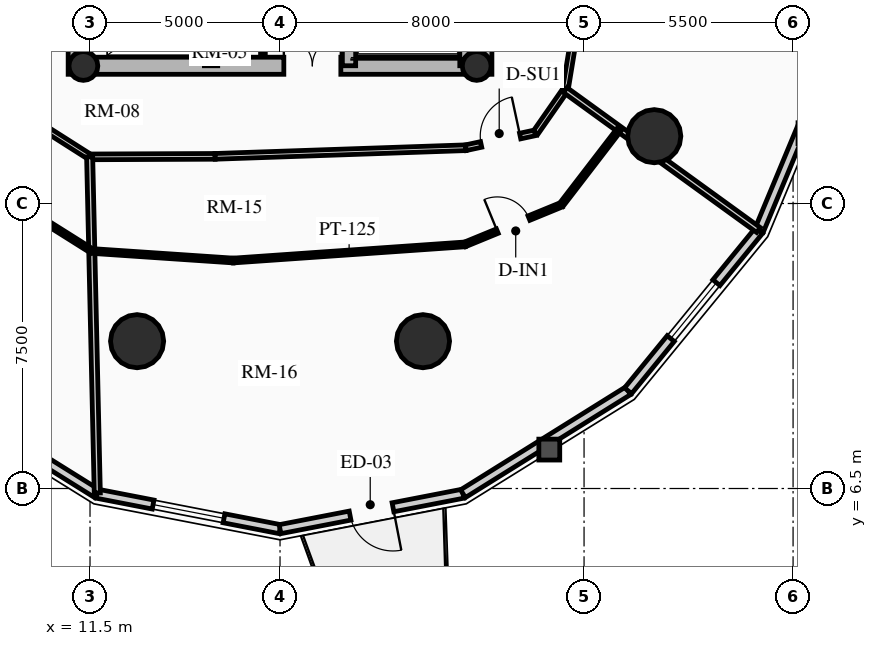
"""IFC4 building model, lengths in metres.
Left out: names, types, materials, properties, quantities, classifications, styles, units other than length and angle.
Written with IfcOpenShell. Run it as: python <this file> out.ifc"""

import sys

from ifc_helpers import new_model, si_unit, direction, frame, frame_2d, origin, origin_2d, place, context, subcontext, project, spatial, rectangle, circle, hollow_circle, extrude, source, transform, mapped, element, fill, save


model = new_model("IFC4")
c1 = context("Model", 3, precision=1e-05, world=origin(), true_north=direction((0.0, 1.0)))
c2 = subcontext(c1, "Body", "Model", "MODEL_VIEW")
j1 = project(units=[si_unit("LENGTHUNIT", "METRE"), si_unit("PLANEANGLEUNIT", "RADIAN")], contexts=[c1])
p1 = place(None, origin())
s1 = spatial("IfcSite", under=j1, at=p1, CompositionType="ELEMENT")
p2 = place(p1, origin())
s2 = spatial("IfcBuilding", under=s1, at=p2, CompositionType="ELEMENT")
p3 = place(p2, frame((0.0, 0.0, 87.61)))
s3 = spatial("IfcBuildingStorey", under=s2, at=p3, CompositionType="ELEMENT", Elevation=87.61)
for number, where, z_axis, x_axis in (
    (1, (11.15, 17.4, 0.0), (0.0, 0.0, 1.0), (0.0, 1.0, 0.0)),
    (2, (21.85, 17.4, 0.0), (0.0, 0.0, 1.0), (0.0, 1.0, 0.0)),
):
    element("IfcWall", number, at=place(p3, frame(where, z_axis=z_axis, x_axis=x_axis)), inside=s3, PredefinedType="SHEAR", context=c2, shape_type="SweptSolid", body=[
        extrude(rectangle(XDim=14.2, YDim=0.45, at=frame_2d((7.1, 0.0))), origin(), (0.0, 0.0, 1.0), 2.91),
    ])
p4 = place(p3, frame((11.15, 17.625, 0.0), z_axis=(0.0, 0.0, 1.0), x_axis=(1.0, 0.0, 0.0)))
e3 = element("IfcWall", 3, at=p4, inside=s3, PredefinedType="SHEAR", context=c2, shape_type="SweptSolid", body=[
    extrude(rectangle(XDim=10.7, YDim=0.45, at=frame_2d((5.35, 0.0))), origin(), (0.0, 0.0, 1.0), 2.91),
])
m1 = source(origin(), c2, "Body", "SweptSolid", [
    extrude(rectangle(XDim=1.5, YDim=2.02, at=frame_2d((0.75, 1.01))), frame((0.0, 0.235, 0.0), z_axis=(0.0, -1.0, 0.0), x_axis=(1.0, 0.0, 0.0)), (0.0, 0.0, 1.0), 0.47),
])
p5 = place(p4, frame((5.45, 0.0, 0.0)))
e4 = element("IfcOpeningElement", 4, at=p5, cuts=e3, PredefinedType="OPENING", context=c2, shape_type="MappedRepresentation", body=[
    mapped(m1, transform((0.0, 0.0, 0.0), x_axis=(1.0, 0.0, 0.0), y_axis=(0.0, 1.0, 0.0), z_axis=(0.0, 0.0, 1.0), scale=1.0)),
])
p6 = place(p3, frame((14.685, 17.625, 0.0), z_axis=(0.0, 0.0, 1.0), x_axis=(0.0, 1.0, 0.0)))
e5 = element("IfcWall", 5, at=p6, inside=s3, PredefinedType="SHEAR", context=c2, shape_type="SweptSolid", body=[
    extrude(rectangle(XDim=13.75, YDim=0.35, at=frame_2d((6.875, 0.0))), origin(), (0.0, 0.0, 1.0), 2.91),
])
m2 = source(origin(), c2, "Body", "SweptSolid", [
    extrude(rectangle(XDim=1.1, YDim=2.015, at=frame_2d((0.55, 1.007))), frame((0.0, 0.185, 0.0), z_axis=(0.0, -1.0, 0.0), x_axis=(1.0, 0.0, 0.0)), (0.0, 0.0, 1.0), 0.37),
])
p7 = place(p6, frame((4.875, 0.0, 0.0)))
e6 = element("IfcOpeningElement", 6, at=p7, cuts=e5, PredefinedType="OPENING", context=c2, shape_type="MappedRepresentation", body=[
    mapped(m2, transform((0.0, 0.0, 0.0), x_axis=(1.0, 0.0, 0.0), y_axis=(0.0, 1.0, 0.0), z_axis=(0.0, 0.0, 1.0), scale=1.0)),
])
m3 = source(origin(), c2, "Body", "SweptSolid", [
    extrude(rectangle(XDim=1.15, YDim=2.02, at=frame_2d((0.575, 1.01))), frame((0.0, 0.185, 0.0), z_axis=(0.0, -1.0, 0.0), x_axis=(1.0, 0.0, 0.0)), (0.0, 0.0, 1.0), 0.37),
])
p8 = place(p6, frame((7.295, 0.0, 0.0)))
e7 = element("IfcOpeningElement", 7, at=p8, cuts=e5, PredefinedType="OPENING", context=c2, shape_type="MappedRepresentation", body=[
    mapped(m3, transform((0.0, 0.0, 0.0), x_axis=(1.0, 0.0, 0.0), y_axis=(0.0, 1.0, 0.0), z_axis=(0.0, 0.0, 1.0), scale=1.0)),
])
p9 = place(p3, frame((18.315, 17.625, 0.0), z_axis=(0.0, 0.0, 1.0), x_axis=(0.0, 1.0, 0.0)))
e8 = element("IfcWall", 8, at=p9, inside=s3, PredefinedType="SHEAR", context=c2, shape_type="SweptSolid", body=[
    extrude(rectangle(XDim=13.75, YDim=0.35, at=frame_2d((6.875, 0.0))), origin(), (0.0, 0.0, 1.0), 2.91),
])
p10 = place(p9, frame((10.0, 0.0, 0.0)))
e9 = element("IfcOpeningElement", 9, at=p10, cuts=e8, PredefinedType="OPENING", context=c2, shape_type="MappedRepresentation", body=[
    mapped(m2, transform((0.0, 0.0, 0.0), x_axis=(1.0, 0.0, 0.0), y_axis=(0.0, 1.0, 0.0), z_axis=(0.0, 0.0, 1.0), scale=1.0)),
])
p11 = place(p9, frame((12.0, 0.0, 0.0)))
e10 = element("IfcOpeningElement", 10, at=p11, cuts=e8, PredefinedType="OPENING", context=c2, shape_type="MappedRepresentation", body=[
    mapped(m2, transform((0.0, 0.0, 0.0), x_axis=(1.0, 0.0, 0.0), y_axis=(0.0, 1.0, 0.0), z_axis=(0.0, 0.0, 1.0), scale=1.0)),
])
p12 = place(p9, frame((5.305, 0.0, 0.0)))
e11 = element("IfcOpeningElement", 11, at=p12, cuts=e8, PredefinedType="OPENING", context=c2, shape_type="MappedRepresentation", body=[
    mapped(m3, transform((0.0, 0.0, 0.0), x_axis=(1.0, 0.0, 0.0), y_axis=(0.0, 1.0, 0.0), z_axis=(0.0, 0.0, 1.0), scale=1.0)),
])
p13 = place(p3, frame((21.405, 17.625, 0.0), z_axis=(0.0, 0.0, 1.0), x_axis=(0.0, 1.0, 0.0)))
e12 = element("IfcWall", 12, at=p13, inside=s3, PredefinedType="SHEAR", context=c2, shape_type="SweptSolid", body=[
    extrude(rectangle(XDim=6.72, YDim=0.35, at=frame_2d((3.36, 0.0))), origin(), (0.0, 0.0, 1.0), 2.91),
])
for number, where, z_axis, x_axis in (
    (13, (11.325, 17.62, 0.0), (0.0, 0.0, 1.0), (1.0, 0.0, 0.0)),
    (14, (21.675, 17.62, 0.0), (0.0, 0.0, 1.0), (1.0, 0.0, 0.0)),
):
    element("IfcColumn", number, at=place(p3, frame(where, z_axis=z_axis, x_axis=x_axis)), inside=s3, PredefinedType="COLUMN", context=c2, shape_type="SweptSolid", body=[
        extrude(hollow_circle(Radius=0.38, WallThickness=0.032, at=origin_2d()), origin(), (0.0, 0.0, 1.0), 2.91),
    ])
for number, where, z_axis, x_axis in (
    (15, (12.739, 10.377, 0.0), (0.0, 0.0, 1.0), (1.0, 0.0, 0.0)),
    (16, (20.261, 10.377, 0.0), (0.0, 0.0, 1.0), (1.0, 0.0, 0.0)),
    (17, (26.347, 15.771, 0.0), (0.0, 0.0, 1.0), (1.0, 0.0, 0.0)),
):
    element("IfcColumn", number, at=place(p3, frame(where, z_axis=z_axis, x_axis=x_axis)), inside=s3, PredefinedType="USERDEFINED", context=c2, shape_type="SweptSolid", body=[
        extrude(circle(Radius=0.7, at=origin_2d()), origin(), (0.0, 0.0, 1.0), 2.91),
    ])
p14 = place(p3, frame((11.685, 6.363, 0.0), z_axis=(0.0, 0.0, 1.0), x_axis=(-0.848520380187, 0.529162701263, 0.0)))
e18 = element("IfcWall", 18, at=p14, inside=s3, PredefinedType="SOLIDWALL", context=c2, shape_type="SweptSolid", body=[
    extrude(rectangle(XDim=5.119, YDim=0.24, at=frame_2d((2.56, 0.0))), origin(), (0.0, 0.0, 1.0), 2.179),
])
m4 = source(origin(), c2, "Body", "SweptSolid", [
    extrude(rectangle(XDim=1.9, YDim=1.35, at=frame_2d((0.95, 0.675))), frame((0.0, 0.13, 0.0), z_axis=(0.0, -1.0, 0.0), x_axis=(1.0, 0.0, 0.0)), (0.0, 0.0, 1.0), 0.26),
])
p15 = place(p14, frame((1.609, 0.0, 0.65)))
e19 = element("IfcOpeningElement", 19, at=p15, cuts=e18, PredefinedType="OPENING", context=c2, shape_type="MappedRepresentation", body=[
    mapped(m4, transform((0.0, 0.0, 0.0), x_axis=(1.0, 0.0, 0.0), y_axis=(0.0, 1.0, 0.0), z_axis=(0.0, 0.0, 1.0), scale=1.0)),
])
p16 = place(p3, frame((16.5, 5.43, 0.0), z_axis=(0.0, 0.0, 1.0), x_axis=(-0.981723785992, 0.190311344954, 0.0)))
e20 = element("IfcWall", 20, at=p16, inside=s3, PredefinedType="SOLIDWALL", context=c2, shape_type="SweptSolid", body=[
    extrude(rectangle(XDim=4.904, YDim=0.24, at=frame_2d((2.452, 0.0))), origin(), (0.0, 0.0, 1.0), 2.179),
])
p17 = place(p16, frame((1.502, 0.0, 0.65)))
e21 = element("IfcOpeningElement", 21, at=p17, cuts=e20, PredefinedType="OPENING", context=c2, shape_type="MappedRepresentation", body=[
    mapped(m4, transform((0.0, 0.0, 0.0), x_axis=(1.0, 0.0, 0.0), y_axis=(0.0, 1.0, 0.0), z_axis=(0.0, 0.0, 1.0), scale=1.0)),
])
p18 = place(p3, frame((21.315, 6.363, 0.0), z_axis=(0.0, 0.0, 1.0), x_axis=(-0.981723785992, -0.190311344954, 0.0)))
e22 = element("IfcWall", 22, at=p18, inside=s3, PredefinedType="SOLIDWALL", context=c2, shape_type="SweptSolid", body=[
    extrude(rectangle(XDim=4.904, YDim=0.24, at=frame_2d((2.452, 0.0))), origin(), (0.0, 0.0, 1.0), 2.179),
])
m5 = source(origin(), c2, "Body", "SweptSolid", [
    extrude(rectangle(XDim=1.15, YDim=2.005, at=frame_2d((0.575, 1.002))), frame((0.0, 0.13, 0.0), z_axis=(0.0, -1.0, 0.0), x_axis=(1.0, 0.0, 0.0)), (0.0, 0.0, 1.0), 0.26),
])
p19 = place(p18, frame((1.877, 0.0, 0.0)))
e23 = element("IfcOpeningElement", 23, at=p19, cuts=e22, PredefinedType="OPENING", context=c2, shape_type="MappedRepresentation", body=[
    mapped(m5, transform((0.0, 0.0, 0.0), x_axis=(1.0, 0.0, 0.0), y_axis=(0.0, 1.0, 0.0), z_axis=(0.0, 0.0, 1.0), scale=1.0)),
])
p20 = place(p3, frame((25.658, 9.072, 0.0), z_axis=(0.0, 0.0, 1.0), x_axis=(-0.848520380187, -0.529162701263, 0.0)))
e24 = element("IfcWall", 24, at=p20, inside=s3, PredefinedType="SOLIDWALL", context=c2, shape_type="SweptSolid", body=[
    extrude(rectangle(XDim=5.119, YDim=0.24, at=frame_2d((2.56, 0.0))), origin(), (0.0, 0.0, 1.0), 2.179),
])
p21 = place(p3, frame((29.105, 13.291, 0.0), z_axis=(0.0, 0.0, 1.0), x_axis=(-0.632700781152, -0.77439635945, 0.0)))
e25 = element("IfcWall", 25, at=p21, inside=s3, PredefinedType="SOLIDWALL", context=c2, shape_type="SweptSolid", body=[
    extrude(rectangle(XDim=5.448, YDim=0.24, at=frame_2d((2.724, 0.0))), origin(), (0.0, 0.0, 1.0), 2.179),
])
p22 = place(p21, frame((1.774, 0.0, 0.65)))
e26 = element("IfcOpeningElement", 26, at=p22, cuts=e25, PredefinedType="OPENING", context=c2, shape_type="MappedRepresentation", body=[
    mapped(m4, transform((0.0, 0.0, 0.0), x_axis=(1.0, 0.0, 0.0), y_axis=(0.0, 1.0, 0.0), z_axis=(0.0, 0.0, 1.0), scale=1.0)),
])
p23 = place(p3, frame((31.318, 18.607, 0.0), z_axis=(0.0, 0.0, 1.0), x_axis=(-0.384344417632, -0.923189779317, 0.0)))
e27 = element("IfcWall", 27, at=p23, inside=s3, PredefinedType="SOLIDWALL", context=c2, shape_type="SweptSolid", body=[
    extrude(rectangle(XDim=5.758, YDim=0.24, at=frame_2d((2.879, 0.0))), origin(), (0.0, 0.0, 1.0), 2.179),
])
p24 = place(p3, frame((16.05, 17.92, 0.0), z_axis=(0.0, 0.0, 1.0), x_axis=(0.0, 1.0, 0.0)))
e28 = element("IfcWall", 28, at=p24, inside=s3, PredefinedType="PARTITIONING", context=c2, shape_type="SweptSolid", body=[
    extrude(rectangle(XDim=3.08, YDim=0.125, at=frame_2d((1.54, 0.0))), origin(), (0.0, 0.0, 1.0), 2.655),
])
m6 = source(origin(), c2, "Body", "SweptSolid", [
    extrude(rectangle(XDim=0.9, YDim=2.005, at=frame_2d((0.45, 1.002))), frame((0.0, 0.073, 0.0), z_axis=(0.0, -1.0, 0.0), x_axis=(1.0, 0.0, 0.0)), (0.0, 0.0, 1.0), 0.145),
])
p25 = place(p24, frame((1.05, 0.0, 0.0)))
e29 = element("IfcOpeningElement", 29, at=p25, cuts=e28, PredefinedType="OPENING", context=c2, shape_type="MappedRepresentation", body=[
    mapped(m6, transform((0.0, 0.0, 0.0), x_axis=(1.0, 0.0, 0.0), y_axis=(0.0, 1.0, 0.0), z_axis=(0.0, 0.0, 1.0), scale=1.0)),
])
p26 = place(p3, frame((10.156, 16.075, 0.0), z_axis=(0.0, 0.0, 1.0), x_axis=(0.843896624713, -0.536505812455, 0.0)))
e30 = element("IfcWall", 30, at=p26, inside=s3, PredefinedType="PARTITIONING", context=c2, shape_type="SweptSolid", body=[
    extrude(rectangle(XDim=1.581, YDim=0.15, at=frame_2d((0.791, 0.0))), origin(), (0.0, 0.0, 1.0), 2.225),
])
p27 = place(p3, frame((11.49, 15.227, 0.0), z_axis=(0.0, 0.0, 1.0), x_axis=(0.999991728046, 0.004067411998, 0.0)))
e31 = element("IfcWall", 31, at=p27, inside=s3, PredefinedType="PARTITIONING", context=c2, shape_type="SweptSolid", body=[
    extrude(rectangle(XDim=3.301, YDim=0.15, at=frame_2d((1.651, 0.0))), origin(), (0.0, 0.0, 1.0), 2.225),
])
p28 = place(p3, frame((14.792, 15.24, 0.0), z_axis=(0.0, 0.0, 1.0), x_axis=(0.999408106202, 0.034401122909, 0.0)))
e32 = element("IfcWall", 32, at=p28, inside=s3, PredefinedType="PARTITIONING", context=c2, shape_type="SweptSolid", body=[
    extrude(rectangle(XDim=6.6, YDim=0.15, at=frame_2d((3.3, 0.0))), origin(), (0.0, 0.0, 1.0), 2.225),
])
p29 = place(p3, frame((21.388, 15.468, 0.0), z_axis=(0.0, 0.0, 1.0), x_axis=(0.977672748596, 0.210133283069, 0.0)))
e33 = element("IfcWall", 33, at=p29, inside=s3, PredefinedType="PARTITIONING", context=c2, shape_type="SweptSolid", body=[
    extrude(rectangle(XDim=1.876, YDim=0.15, at=frame_2d((0.938, 0.0))), origin(), (0.0, 0.0, 1.0), 2.225),
])
m7 = source(origin(), c2, "Body", "SweptSolid", [
    extrude(rectangle(XDim=1.05, YDim=2.015, at=frame_2d((0.525, 1.007))), frame((0.0, 0.085, 0.0), z_axis=(0.0, -1.0, 0.0), x_axis=(1.0, 0.0, 0.0)), (0.0, 0.0, 1.0), 0.17),
])
p30 = place(p29, frame((0.413, 0.0, 0.0)))
e34 = element("IfcOpeningElement", 34, at=p30, cuts=e33, PredefinedType="OPENING", context=c2, shape_type="MappedRepresentation", body=[
    mapped(m7, transform((0.0, 0.0, 0.0), x_axis=(1.0, 0.0, 0.0), y_axis=(0.0, 1.0, 0.0), z_axis=(0.0, 0.0, 1.0), scale=1.0)),
])
p31 = place(p3, frame((23.222, 15.862, 0.0), z_axis=(0.0, 0.0, 1.0), x_axis=(0.571941738195, 0.820294244836, 0.0)))
e35 = element("IfcWall", 35, at=p31, inside=s3, PredefinedType="PARTITIONING", context=c2, shape_type="SweptSolid", body=[
    extrude(rectangle(XDim=1.369, YDim=0.15, at=frame_2d((0.685, 0.0))), origin(), (0.0, 0.0, 1.0), 2.225),
])
p32 = place(p3, frame((24.006, 16.985, 0.0), z_axis=(0.0, 0.0, 1.0), x_axis=(0.162043475877, 0.986783619608, 0.0)))
e36 = element("IfcWall", 36, at=p32, inside=s3, PredefinedType="PARTITIONING", context=c2, shape_type="SweptSolid", body=[
    extrude(rectangle(XDim=1.597, YDim=0.15, at=frame_2d((0.798, 0.0))), origin(), (0.0, 0.0, 1.0), 2.225),
])
p33 = place(p3, frame((11.49, 15.227, 0.0), z_axis=(0.0, 0.0, 1.0), x_axis=(0.022711375682, -0.999742063442, 0.0)))
e37 = element("IfcWall", 37, at=p33, inside=s3, PredefinedType="PARTITIONING", context=c2, shape_type="SweptSolid", body=[
    extrude(rectangle(XDim=8.847, YDim=0.16, at=frame_2d((4.423, 0.0))), origin(), (0.0, 0.0, 1.0), 2.179),
])
p34 = place(p3, frame((24.006, 16.985, 0.0), z_axis=(0.0, 0.0, 1.0), x_axis=(0.809849730791, -0.586637378231, 0.0)))
e38 = element("IfcWall", 38, at=p34, inside=s3, PredefinedType="PARTITIONING", context=c2, shape_type="SweptSolid", body=[
    extrude(rectangle(XDim=6.277, YDim=0.16, at=frame_2d((3.139, 0.0))), origin(), (0.0, 0.0, 1.0), 2.179),
])
p35 = place(p3, frame((9.371, 14.119, 0.0), z_axis=(0.0, 0.0, 1.0), x_axis=(0.846446940893, -0.532473075613, 0.0)))
e39 = element("IfcWall", 39, at=p35, inside=s3, PredefinedType="PARTITIONING", context=c2, shape_type="SweptSolid", body=[
    extrude(rectangle(XDim=2.57, YDim=0.125, at=frame_2d((1.285, 0.0))), origin(), (0.0, 0.0, 1.0), 2.225),
])
p36 = place(p3, frame((11.547, 12.75, 0.0), z_axis=(0.0, 0.0, 1.0), x_axis=(0.997731575096, -0.067317932645, 0.0)))
e40 = element("IfcWall", 40, at=p36, inside=s3, PredefinedType="PARTITIONING", context=c2, shape_type="SweptSolid", body=[
    extrude(rectangle(XDim=3.732, YDim=0.125, at=frame_2d((1.866, 0.0))), origin(), (0.0, 0.0, 1.0), 2.225),
])
p37 = place(p3, frame((15.27, 12.499, 0.0), z_axis=(0.0, 0.0, 1.0), x_axis=(0.997586055533, 0.069441067147, 0.0)))
e41 = element("IfcWall", 41, at=p37, inside=s3, PredefinedType="PARTITIONING", context=c2, shape_type="SweptSolid", body=[
    extrude(rectangle(XDim=6.11, YDim=0.125, at=frame_2d((3.055, 0.0))), origin(), (0.0, 0.0, 1.0), 2.225),
])
p38 = place(p3, frame((21.366, 12.924, 0.0), z_axis=(0.0, 0.0, 1.0), x_axis=(0.924996898971, 0.379974652962, 0.0)))
e42 = element("IfcWall", 42, at=p38, inside=s3, PredefinedType="PARTITIONING", context=c2, shape_type="SweptSolid", body=[
    extrude(rectangle(XDim=2.741, YDim=0.125, at=frame_2d((1.371, 0.0))), origin(), (0.0, 0.0, 1.0), 2.225),
])
p39 = place(p38, frame((0.92, 0.0, 0.0)))
e43 = element("IfcOpeningElement", 43, at=p39, cuts=e42, PredefinedType="OPENING", context=c2, shape_type="MappedRepresentation", body=[
    mapped(m6, transform((0.0, 0.0, 0.0), x_axis=(1.0, 0.0, 0.0), y_axis=(0.0, 1.0, 0.0), z_axis=(0.0, 0.0, 1.0), scale=1.0)),
])
p40 = place(p3, frame((23.901, 13.965, 0.0), z_axis=(0.0, 0.0, 1.0), x_axis=(0.609164923344, 0.793043565113, 0.0)))
e44 = element("IfcWall", 44, at=p40, inside=s3, PredefinedType="PARTITIONING", context=c2, shape_type="SweptSolid", body=[
    extrude(rectangle(XDim=2.508, YDim=0.125, at=frame_2d((1.254, 0.0))), origin(), (0.0, 0.0, 1.0), 2.655),
])
m8 = source(origin(), c2, "Body", "SweptSolid", [
    extrude(rectangle(XDim=1.9, YDim=1.35, at=frame_2d((0.95, 0.675))), frame((0.0, 0.03, 0.0), z_axis=(0.0, -1.0, 0.0), x_axis=(1.0, 0.0, 0.0)), (0.0, 0.0, 1.0), 0.06),
])
p41 = place(p17, origin())
e45 = element("IfcWindow", 45, at=p41, inside=s3, PartitioningType="DOUBLE_PANEL_VERTICAL", PredefinedType="WINDOW", context=c2, shape_type="MappedRepresentation", body=[
    mapped(m8, transform((0.0, 0.0, 0.0), x_axis=(1.0, 0.0, 0.0), y_axis=(0.0, 1.0, 0.0), z_axis=(0.0, 0.0, 1.0), scale=1.0)),
])
fill(e21, e45)
m9 = source(origin(), c2, "Body", "SweptSolid", [
    extrude(rectangle(XDim=1.15, YDim=2.005, at=frame_2d((0.575, 1.002))), frame((0.0, 0.025, 0.0), z_axis=(0.0, -1.0, 0.0), x_axis=(1.0, 0.0, 0.0)), (0.0, 0.0, 1.0), 0.05),
])
p42 = place(p19, origin())
e46 = element("IfcDoor", 46, at=p42, inside=s3, OperationType="SINGLE_SWING_LEFT", PredefinedType="DOOR", context=c2, shape_type="MappedRepresentation", body=[
    mapped(m9, transform((0.0, 0.0, 0.0), x_axis=(1.0, 0.0, 0.0), y_axis=(0.0, 1.0, 0.0), z_axis=(0.0, 0.0, 1.0), scale=1.0)),
])
fill(e23, e46)
p43 = place(p22, origin())
e47 = element("IfcWindow", 47, at=p43, inside=s3, PartitioningType="DOUBLE_PANEL_VERTICAL", PredefinedType="WINDOW", context=c2, shape_type="MappedRepresentation", body=[
    mapped(m8, transform((0.0, 0.0, 0.0), x_axis=(1.0, 0.0, 0.0), y_axis=(0.0, 1.0, 0.0), z_axis=(0.0, 0.0, 1.0), scale=1.0)),
])
fill(e26, e47)
m10 = source(origin(), c2, "Body", "SweptSolid", [
    extrude(rectangle(XDim=1.5, YDim=2.02, at=frame_2d((0.75, 1.01))), frame((0.0, 0.025, 0.0), z_axis=(0.0, -1.0, 0.0), x_axis=(1.0, 0.0, 0.0)), (0.0, 0.0, 1.0), 0.05),
])
p44 = place(p5, origin())
e48 = element("IfcDoor", 48, at=p44, inside=s3, OperationType="DOUBLE_DOOR_SINGLE_SWING", PredefinedType="DOOR", context=c2, shape_type="MappedRepresentation", body=[
    mapped(m10, transform((0.0, 0.0, 0.0), x_axis=(1.0, 0.0, 0.0), y_axis=(0.0, 1.0, 0.0), z_axis=(0.0, 0.0, 1.0), scale=1.0)),
])
fill(e4, e48)
m11 = source(origin(), c2, "Body", "SweptSolid", [
    extrude(rectangle(XDim=1.05, YDim=2.015, at=frame_2d((0.525, 1.007))), frame((0.0, 0.025, 0.0), z_axis=(0.0, -1.0, 0.0), x_axis=(1.0, 0.0, 0.0)), (0.0, 0.0, 1.0), 0.05),
])
p45 = place(p30, origin())
e49 = element("IfcDoor", 49, at=p45, inside=s3, OperationType="SINGLE_SWING_RIGHT", PredefinedType="DOOR", context=c2, shape_type="MappedRepresentation", body=[
    mapped(m11, transform((0.0, 0.0, 0.0), x_axis=(1.0, 0.0, 0.0), y_axis=(0.0, 1.0, 0.0), z_axis=(0.0, 0.0, 1.0), scale=1.0)),
])
fill(e34, e49)
m12 = source(origin(), c2, "Body", "SweptSolid", [
    extrude(rectangle(XDim=0.9, YDim=2.005, at=frame_2d((0.45, 1.002))), frame((0.0, 0.025, 0.0), z_axis=(0.0, -1.0, 0.0), x_axis=(1.0, 0.0, 0.0)), (0.0, 0.0, 1.0), 0.05),
])
p46 = place(p39, origin())
e50 = element("IfcDoor", 50, at=p46, inside=s3, OperationType="SINGLE_SWING_LEFT", PredefinedType="DOOR", context=c2, shape_type="MappedRepresentation", body=[
    mapped(m12, transform((0.0, 0.0, 0.0), x_axis=(1.0, 0.0, 0.0), y_axis=(0.0, 1.0, 0.0), z_axis=(0.0, 0.0, 1.0), scale=1.0)),
])
fill(e43, e50)
save(model, sys.argv[1])
